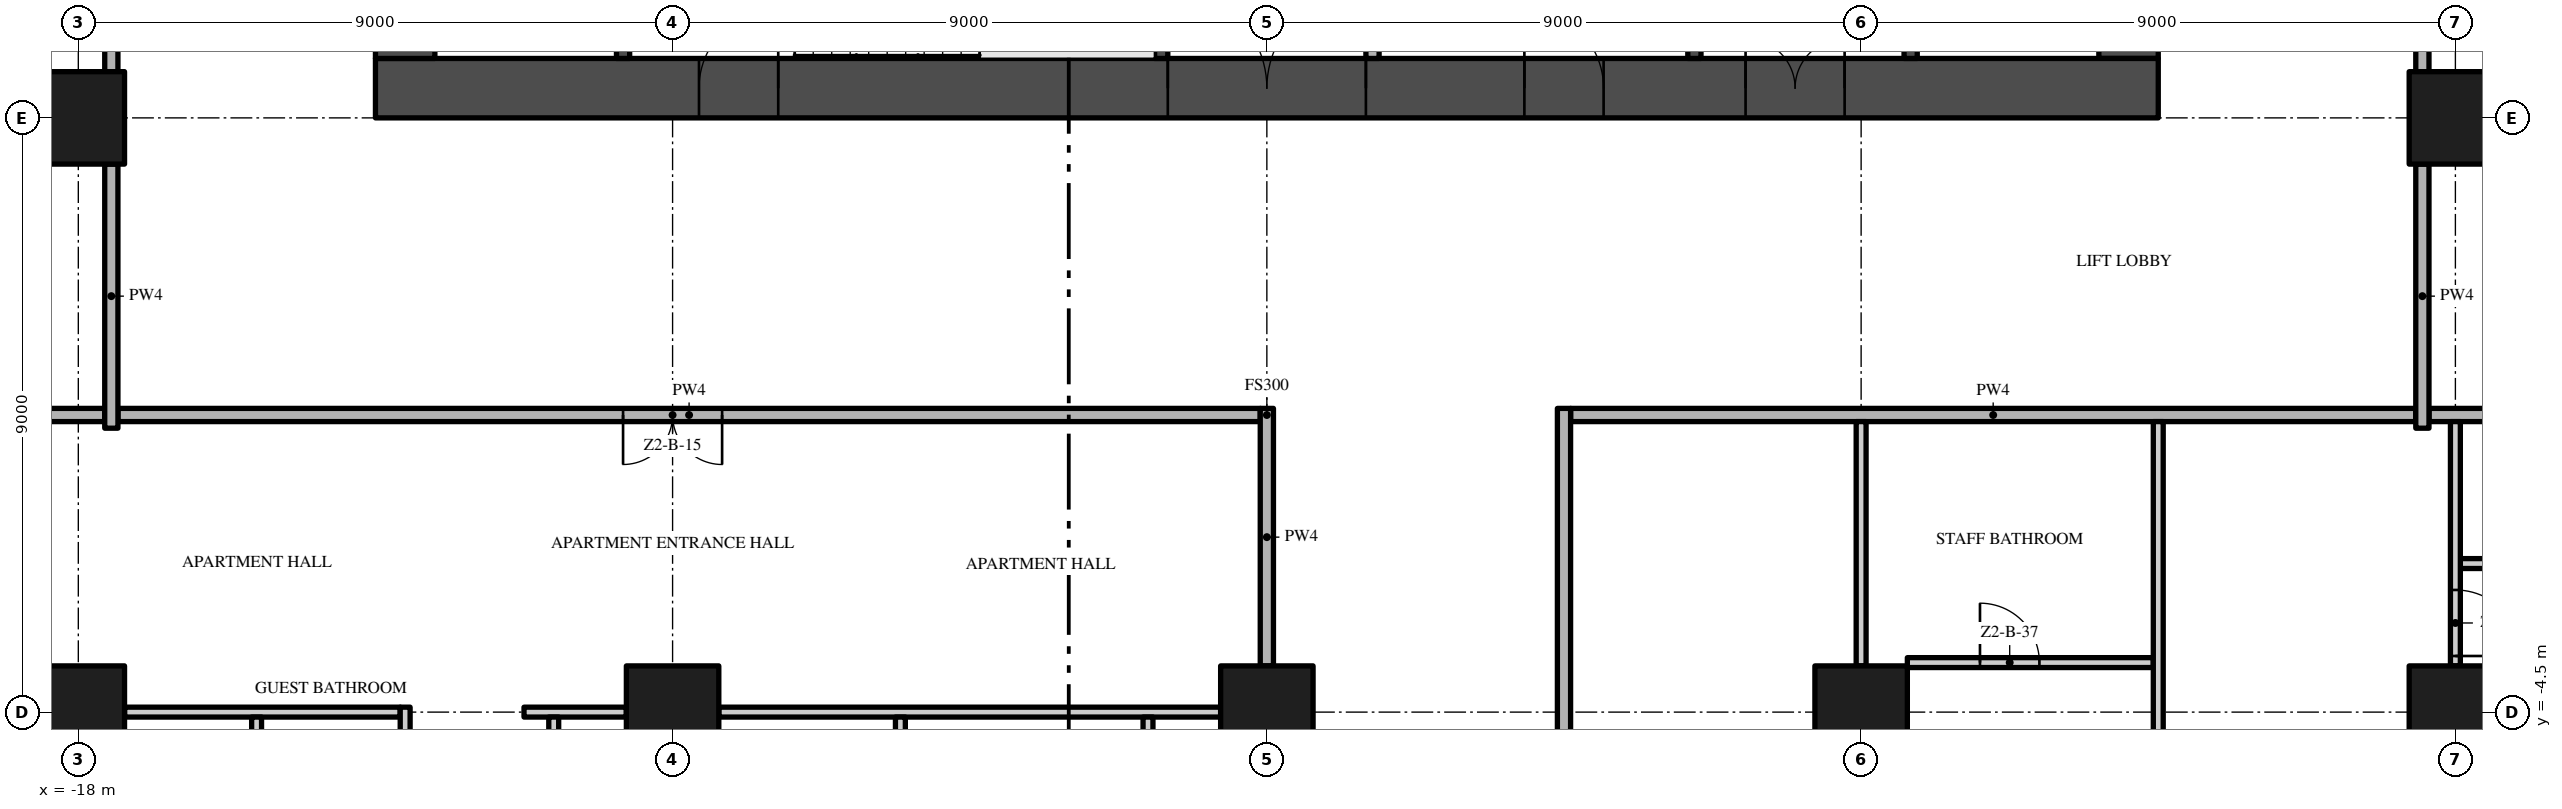
"""IFC4 building model, lengths in metres.
Left out: names, types, materials, properties, quantities, classifications, styles, units other than length and angle.
Written with IfcOpenShell. Run it as: python <this file> out.ifc"""

import sys

from ifc_helpers import new_model, si_unit, direction, frame, frame_2d, origin, origin_2d, place, context, subcontext, project, spatial, rectangle, extrude, element, fill, save


model = new_model("IFC4")
c1 = context("Model", 3, precision=1e-05, world=origin(), true_north=direction((0.0, 1.0)))
c2 = subcontext(c1, "Body", "Model", "MODEL_VIEW")
j1 = project(units=[si_unit("LENGTHUNIT", "METRE"), si_unit("PLANEANGLEUNIT", "RADIAN")], contexts=[c1])
p1 = place(None, origin())
s1 = spatial("IfcSite", under=j1, at=p1, CompositionType="ELEMENT")
p2 = place(p1, origin())
s2 = spatial("IfcBuilding", under=s1, at=p2, CompositionType="ELEMENT")
p3 = place(p2, frame((0.0, 0.0, 80.8)))
s3 = spatial("IfcBuildingStorey", under=s2, at=p3, CompositionType="ELEMENT", Elevation=80.8)
p4 = place(p3, frame((-13.5, 4.95, -0.3), z_axis=(0.0, 0.0, 1.0), x_axis=(1.0, 0.0, 0.0)))
e1 = element("IfcWall", 1, at=p4, inside=s3, PredefinedType="SHEAR", context=c2, shape_type="SweptSolid", body=[
    extrude(rectangle(XDim=27.0, YDim=0.9, at=frame_2d((13.5, 0.0))), origin(), (0.0, 0.0, 1.0), 3.8),
])
p5 = place(p4, frame((12.0, 0.0, 0.3)))
e2 = element("IfcOpeningElement", 2, at=p5, cuts=e1, PredefinedType="OPENING", context=c2, shape_type="SweptSolid", body=[
    extrude(rectangle(XDim=3.0, YDim=2.4, at=frame_2d((1.5, 1.2))), frame((0.0, 0.46, 0.0), z_axis=(0.0, -1.0, 0.0), x_axis=(1.0, 0.0, 0.0)), (0.0, 0.0, 1.0), 0.92),
])
p6 = place(p4, frame((4.9, 0.0, 0.3)))
e3 = element("IfcOpeningElement", 3, at=p6, cuts=e1, PredefinedType="OPENING", context=c2, shape_type="SweptSolid", body=[
    extrude(rectangle(XDim=1.2, YDim=2.2, at=frame_2d((0.6, 1.1))), frame((0.0, 0.46, 0.0), z_axis=(0.0, -1.0, 0.0), x_axis=(1.0, 0.0, 0.0)), (0.0, 0.0, 1.0), 0.92),
])
p7 = place(p4, frame((20.75, 0.0, 0.3)))
e4 = element("IfcOpeningElement", 4, at=p7, cuts=e1, PredefinedType="OPENING", context=c2, shape_type="SweptSolid", body=[
    extrude(rectangle(XDim=1.5, YDim=2.2, at=frame_2d((0.75, 1.1))), frame((0.0, 0.46, 0.0), z_axis=(0.0, -1.0, 0.0), x_axis=(1.0, 0.0, 0.0)), (0.0, 0.0, 1.0), 0.92),
])
p8 = place(p4, frame((17.4, 0.0, 0.3)))
e5 = element("IfcOpeningElement", 5, at=p8, cuts=e1, PredefinedType="OPENING", context=c2, shape_type="SweptSolid", body=[
    extrude(rectangle(XDim=1.2, YDim=2.2, at=frame_2d((0.6, 1.1))), frame((0.0, 0.46, 0.0), z_axis=(0.0, -1.0, 0.0), x_axis=(1.0, 0.0, 0.0)), (0.0, 0.0, 1.0), 0.92),
])
p9 = place(p3, frame((13.05, 5.4, -0.3), z_axis=(0.0, 0.0, 1.0), x_axis=(0.0, 1.0, 0.0)))
e6 = element("IfcWall", 6, at=p9, inside=s3, PredefinedType="SHEAR", context=c2, shape_type="SweptSolid", body=[
    extrude(rectangle(XDim=16.2, YDim=0.9, at=frame_2d((8.1, 0.0))), origin(), (0.0, 0.0, 1.0), 3.8),
])
p10 = place(p9, frame((6.0, 0.0, 0.3)))
e7 = element("IfcOpeningElement", 7, at=p10, cuts=e6, PredefinedType="OPENING", context=c2, shape_type="SweptSolid", body=[
    extrude(rectangle(XDim=1.2, YDim=2.2, at=frame_2d((0.6, 1.1))), frame((0.0, 0.46, 0.0), z_axis=(0.0, -1.0, 0.0), x_axis=(1.0, 0.0, 0.0)), (0.0, 0.0, 1.0), 0.92),
])
p11 = place(p3, frame((-13.05, 21.6, -0.3), z_axis=(0.0, 0.0, 1.0), x_axis=(0.0, -1.0, 0.0)))
e8 = element("IfcWall", 8, at=p11, inside=s3, PredefinedType="SHEAR", context=c2, shape_type="SweptSolid", body=[
    extrude(rectangle(XDim=16.2, YDim=0.9, at=frame_2d((8.1, 0.0))), origin(), (0.0, 0.0, 1.0), 3.8),
])
p12 = place(p11, frame((9.0, 0.0, 0.3)))
e9 = element("IfcOpeningElement", 9, at=p12, cuts=e8, PredefinedType="OPENING", context=c2, shape_type="SweptSolid", body=[
    extrude(rectangle(XDim=1.2, YDim=2.2, at=frame_2d((0.6, 1.1))), frame((0.0, 0.46, 0.0), z_axis=(0.0, -1.0, 0.0), x_axis=(1.0, 0.0, 0.0)), (0.0, 0.0, 1.0), 0.92),
])
for number, where, z_axis, x_axis in (
    (10, (-18.0, -4.5, 0.0), (0.0, 0.0, 1.0), (1.0, 0.0, 0.0)),
    (11, (-18.0, 4.5, 0.0), (0.0, 0.0, 1.0), (1.0, 0.0, 0.0)),
    (12, (-9.0, -4.5, 0.0), (0.0, 0.0, 1.0), (1.0, 0.0, 0.0)),
    (13, (0.0, -4.5, 0.0), (0.0, 0.0, 1.0), (1.0, 0.0, 0.0)),
    (14, (18.0, -4.5, 0.0), (0.0, 0.0, 1.0), (1.0, 0.0, 0.0)),
    (15, (18.0, 4.5, 0.0), (0.0, 0.0, 1.0), (1.0, 0.0, 0.0)),
    (16, (9.0, -4.5, 0.0), (0.0, 0.0, 1.0), (1.0, 0.0, 0.0)),
):
    element("IfcColumn", number, at=place(p3, frame(where, z_axis=z_axis, x_axis=x_axis)), inside=s3, PredefinedType="COLUMN", context=c2, shape_type="SweptSolid", body=[
        extrude(rectangle(XDim=1.4, YDim=1.4, at=origin_2d()), origin(), (0.0, 0.0, 1.0), 3.5),
    ])
for number, where, z_axis, x_axis in (
    (17, (-9.75, 5.4, 0.0), (0.0, 0.0, 1.0), (0.0, 1.0, 0.0)),
    (18, (-1.6, 5.4, 0.0), (0.0, 0.0, 1.0), (0.0, 1.0, 0.0)),
):
    element("IfcWall", number, at=place(p3, frame(where, z_axis=z_axis, x_axis=x_axis)), inside=s3, PredefinedType="SHEAR", context=c2, shape_type="SweptSolid", body=[
        extrude(rectangle(XDim=2.55, YDim=0.2, at=frame_2d((1.275, 0.0))), origin(), (0.0, 0.0, 1.0), 3.5),
    ])
p13 = place(p3, frame((1.6, 7.5, 0.0), z_axis=(0.0, 0.0, 1.0), x_axis=(0.0, -1.0, 0.0)))
e19 = element("IfcWall", 19, at=p13, inside=s3, PredefinedType="PARTITIONING", context=c2, shape_type="SweptSolid", body=[
    extrude(rectangle(XDim=2.1, YDim=0.2, at=frame_2d((1.05, 0.0))), origin(), (0.0, 0.0, 1.0), 3.5),
])
p14 = place(p13, frame((0.25, 0.0, 0.0)))
e20 = element("IfcOpeningElement", 20, at=p14, cuts=e19, PredefinedType="OPENING", context=c2, shape_type="SweptSolid", body=[
    extrude(rectangle(XDim=0.9, YDim=2.1, at=frame_2d((0.45, 1.05))), frame((0.0, 0.11, 0.0), z_axis=(0.0, -1.0, 0.0), x_axis=(1.0, 0.0, 0.0)), (0.0, 0.0, 1.0), 0.22),
])
p15 = place(p3, frame((6.475, 5.4, 0.0), z_axis=(0.0, 0.0, 1.0), x_axis=(0.0, 1.0, 0.0)))
e21 = element("IfcWall", 21, at=p15, inside=s3, PredefinedType="SHEAR", context=c2, shape_type="SweptSolid", body=[
    extrude(rectangle(XDim=2.1, YDim=0.2, at=frame_2d((1.05, 0.0))), origin(), (0.0, 0.0, 1.0), 3.5),
])
p16 = place(p3, frame((9.75, 5.4, 0.0), z_axis=(0.0, 0.0, 1.0), x_axis=(0.0, 1.0, 0.0)))
e22 = element("IfcWall", 22, at=p16, inside=s3, PredefinedType="SHEAR", context=c2, shape_type="SweptSolid", body=[
    extrude(rectangle(XDim=2.2, YDim=0.2, at=frame_2d((1.1, 0.0))), origin(), (0.0, 0.0, 1.0), 3.5),
])
p17 = place(p16, frame((0.55, 0.0, 0.0)))
e23 = element("IfcOpeningElement", 23, at=p17, cuts=e22, PredefinedType="OPENING", context=c2, shape_type="SweptSolid", body=[
    extrude(rectangle(XDim=1.1, YDim=2.1, at=frame_2d((0.55, 1.05))), frame((0.0, 0.11, 0.0), z_axis=(0.0, -1.0, 0.0), x_axis=(1.0, 0.0, 0.0)), (0.0, 0.0, 1.0), 0.22),
])
p18 = place(p3, frame((-17.3, -4.5, 0.0), z_axis=(0.0, 0.0, 1.0), x_axis=(1.0, 0.0, 0.0)))
e24 = element("IfcWall", 24, at=p18, inside=s3, PredefinedType="PARTITIONING", context=c2, shape_type="SweptSolid", body=[
    extrude(rectangle(XDim=4.175, YDim=0.15, at=frame_2d((2.087, 0.0))), origin(), (0.0, 0.0, 1.0), 3.5),
])
p19 = place(p3, frame((-11.25, -4.5, 0.0), z_axis=(0.0, 0.0, 1.0), x_axis=(1.0, 0.0, 0.0)))
e25 = element("IfcWall", 25, at=p19, inside=s3, PredefinedType="PARTITIONING", context=c2, shape_type="SweptSolid", body=[
    extrude(rectangle(XDim=1.55, YDim=0.15, at=frame_2d((0.775, 0.0))), origin(), (0.0, 0.0, 1.0), 3.5),
])
p20 = place(p3, frame((-8.3, -4.5, 0.0), z_axis=(0.0, 0.0, 1.0), x_axis=(1.0, 0.0, 0.0)))
e26 = element("IfcWall", 26, at=p20, inside=s3, PredefinedType="PARTITIONING", context=c2, shape_type="SweptSolid", body=[
    extrude(rectangle(XDim=7.6, YDim=0.15, at=frame_2d((3.8, 0.0))), origin(), (0.0, 0.0, 1.0), 3.5),
])
p21 = place(p3, frame((9.7, -3.75, 0.0), z_axis=(0.0, 0.0, 1.0), x_axis=(1.0, 0.0, 0.0)))
e27 = element("IfcWall", 27, at=p21, inside=s3, PredefinedType="PARTITIONING", context=c2, shape_type="SweptSolid", body=[
    extrude(rectangle(XDim=3.725, YDim=0.15, at=frame_2d((1.863, 0.0))), origin(), (0.0, 0.0, 1.0), 3.5),
])
p22 = place(p21, frame((1.1, 0.0, 0.0)))
e28 = element("IfcOpeningElement", 28, at=p22, cuts=e27, PredefinedType="OPENING", context=c2, shape_type="SweptSolid", body=[
    extrude(rectangle(XDim=0.9, YDim=2.1, at=frame_2d((0.45, 1.05))), frame((0.0, 0.085, 0.0), z_axis=(0.0, -1.0, 0.0), x_axis=(1.0, 0.0, 0.0)), (0.0, 0.0, 1.0), 0.17),
])
p23 = place(p3, frame((18.075, -2.25, 0.0), z_axis=(0.0, 0.0, 1.0), x_axis=(1.0, 0.0, 0.0)))
e29 = element("IfcWall", 29, at=p23, inside=s3, PredefinedType="PARTITIONING", context=c2, shape_type="SweptSolid", body=[
    extrude(rectangle(XDim=2.85, YDim=0.15, at=frame_2d((1.425, 0.0))), origin(), (0.0, 0.0, 1.0), 3.5),
])
p24 = place(p3, frame((-0.1, 0.0, 0.0), z_axis=(0.0, 0.0, 1.0), x_axis=(-1.0, 0.0, 0.0)))
e30 = element("IfcWall", 30, at=p24, inside=s3, PredefinedType="PARTITIONING", context=c2, shape_type="SweptSolid", body=[
    extrude(rectangle(XDim=17.3, YDim=0.2, at=frame_2d((8.65, 0.0))), origin(), (0.0, 0.0, 1.0), 3.5),
])
p25 = place(p24, frame((8.15, 0.0, 0.0)))
e31 = element("IfcOpeningElement", 31, at=p25, cuts=e30, PredefinedType="OPENING", context=c2, shape_type="SweptSolid", body=[
    extrude(rectangle(XDim=1.5, YDim=2.4, at=frame_2d((0.75, 1.2))), frame((0.0, 0.11, 0.0), z_axis=(0.0, -1.0, 0.0), x_axis=(1.0, 0.0, 0.0)), (0.0, 0.0, 1.0), 0.22),
])
p26 = place(p3, frame((4.6, 0.0, 0.0), z_axis=(0.0, 0.0, 1.0), x_axis=(1.0, 0.0, 0.0)))
e32 = element("IfcWall", 32, at=p26, inside=s3, PredefinedType="PARTITIONING", context=c2, shape_type="SweptSolid", body=[
    extrude(rectangle(XDim=12.8, YDim=0.2, at=frame_2d((6.4, 0.0))), origin(), (0.0, 0.0, 1.0), 3.5),
])
for number, where, z_axis, x_axis in (
    (33, (-26.7, 0.0, 0.0), (0.0, 0.0, 1.0), (1.0, 0.0, 0.0)),
    (34, (17.6, 0.0, 0.0), (0.0, 0.0, 1.0), (1.0, 0.0, 0.0)),
):
    element("IfcWall", number, at=place(p3, frame(where, z_axis=z_axis, x_axis=x_axis)), inside=s3, PredefinedType="PARTITIONING", context=c2, shape_type="SweptSolid", body=[
        extrude(rectangle(XDim=9.1, YDim=0.2, at=frame_2d((4.55, 0.0))), origin(), (0.0, 0.0, 1.0), 3.5),
    ])
p27 = place(p3, frame((-17.5, -0.2, 0.0), z_axis=(0.0, 0.0, 1.0), x_axis=(0.0, 1.0, 0.0)))
e35 = element("IfcWall", 35, at=p27, inside=s3, PredefinedType="PARTITIONING", context=c2, shape_type="SweptSolid", body=[
    extrude(rectangle(XDim=4.0, YDim=0.2, at=frame_2d((2.0, 0.0))), origin(), (0.0, 0.0, 1.0), 3.5),
])
p28 = place(p3, frame((-17.5, 5.2, 0.0), z_axis=(0.0, 0.0, 1.0), x_axis=(0.0, 1.0, 0.0)))
e36 = element("IfcWall", 36, at=p28, inside=s3, PredefinedType="PARTITIONING", context=c2, shape_type="SweptSolid", body=[
    extrude(rectangle(XDim=7.6, YDim=0.2, at=frame_2d((3.8, 0.0))), origin(), (0.0, 0.0, 1.0), 3.5),
])
p29 = place(p3, frame((-15.3, -8.925, 0.0), z_axis=(0.0, 0.0, 1.0), x_axis=(0.0, 1.0, 0.0)))
e37 = element("IfcWall", 37, at=p29, inside=s3, PredefinedType="PARTITIONING", context=c2, shape_type="SweptSolid", body=[
    extrude(rectangle(XDim=4.35, YDim=0.15, at=frame_2d((2.175, 0.0))), origin(), (0.0, 0.0, 1.0), 3.5),
])
p30 = place(p3, frame((-13.05, -9.075, 0.0), z_axis=(0.0, 0.0, 1.0), x_axis=(0.0, 1.0, 0.0)))
e38 = element("IfcWall", 38, at=p30, inside=s3, PredefinedType="PARTITIONING", context=c2, shape_type="SweptSolid", body=[
    extrude(rectangle(XDim=4.65, YDim=0.15, at=frame_2d((2.325, 0.0))), origin(), (0.0, 0.0, 1.0), 3.5),
])
p31 = place(p30, frame((1.875, 0.0, 0.0)))
e39 = element("IfcOpeningElement", 39, at=p31, cuts=e38, PredefinedType="OPENING", context=c2, shape_type="SweptSolid", body=[
    extrude(rectangle(XDim=0.9, YDim=2.1, at=frame_2d((0.45, 1.05))), frame((0.0, 0.085, 0.0), z_axis=(0.0, -1.0, 0.0), x_axis=(1.0, 0.0, 0.0)), (0.0, 0.0, 1.0), 0.17),
])
p32 = place(p3, frame((-10.8, -9.075, 0.0), z_axis=(0.0, 0.0, 1.0), x_axis=(0.0, 1.0, 0.0)))
e40 = element("IfcWall", 40, at=p32, inside=s3, PredefinedType="PARTITIONING", context=c2, shape_type="SweptSolid", body=[
    extrude(rectangle(XDim=4.5, YDim=0.15, at=frame_2d((2.25, 0.0))), origin(), (0.0, 0.0, 1.0), 3.5),
])
p33 = place(p3, frame((-5.55, -4.575, 0.0), z_axis=(0.0, 0.0, 1.0), x_axis=(0.0, -1.0, 0.0)))
e41 = element("IfcWall", 41, at=p33, inside=s3, PredefinedType="PARTITIONING", context=c2, shape_type="SweptSolid", body=[
    extrude(rectangle(XDim=4.35, YDim=0.15, at=frame_2d((2.175, 0.0))), origin(), (0.0, 0.0, 1.0), 3.5),
])
p34 = place(p33, frame((1.7, 0.0, 0.0)))
e42 = element("IfcOpeningElement", 42, at=p34, cuts=e41, PredefinedType="OPENING", context=c2, shape_type="SweptSolid", body=[
    extrude(rectangle(XDim=0.9, YDim=2.1, at=frame_2d((0.45, 1.05))), frame((0.0, 0.085, 0.0), z_axis=(0.0, -1.0, 0.0), x_axis=(1.0, 0.0, 0.0)), (0.0, 0.0, 1.0), 0.17),
])
p35 = place(p3, frame((-1.8, -8.925, 0.0), z_axis=(0.0, 0.0, 1.0), x_axis=(0.0, 1.0, 0.0)))
e43 = element("IfcWall", 43, at=p35, inside=s3, PredefinedType="PARTITIONING", context=c2, shape_type="SweptSolid", body=[
    extrude(rectangle(XDim=4.35, YDim=0.15, at=frame_2d((2.175, 0.0))), origin(), (0.0, 0.0, 1.0), 3.5),
])
p36 = place(p3, frame((0.0, -3.8, 0.0), z_axis=(0.0, 0.0, 1.0), x_axis=(0.0, 1.0, 0.0)))
e44 = element("IfcWall", 44, at=p36, inside=s3, PredefinedType="PARTITIONING", context=c2, shape_type="SweptSolid", body=[
    extrude(rectangle(XDim=3.9, YDim=0.2, at=frame_2d((1.95, 0.0))), origin(), (0.0, 0.0, 1.0), 3.5),
])
p37 = place(p3, frame((4.5, 0.1, 0.0), z_axis=(0.0, 0.0, 1.0), x_axis=(0.0, -1.0, 0.0)))
e45 = element("IfcWall", 45, at=p37, inside=s3, PredefinedType="PARTITIONING", context=c2, shape_type="SweptSolid", body=[
    extrude(rectangle(XDim=22.3, YDim=0.2, at=frame_2d((11.15, 0.0))), origin(), (0.0, 0.0, 1.0), 3.5),
])
p38 = place(p37, frame((10.6, 0.0, 0.0)))
e46 = element("IfcOpeningElement", 46, at=p38, cuts=e45, PredefinedType="OPENING", context=c2, shape_type="SweptSolid", body=[
    extrude(rectangle(XDim=1.5, YDim=2.4, at=frame_2d((0.75, 1.2))), frame((0.0, 0.11, 0.0), z_axis=(0.0, -1.0, 0.0), x_axis=(1.0, 0.0, 0.0)), (0.0, 0.0, 1.0), 0.22),
])
p39 = place(p3, frame((9.0, -3.8, 0.0), z_axis=(0.0, 0.0, 1.0), x_axis=(0.0, 1.0, 0.0)))
e47 = element("IfcWall", 47, at=p39, inside=s3, PredefinedType="PARTITIONING", context=c2, shape_type="SweptSolid", body=[
    extrude(rectangle(XDim=3.7, YDim=0.15, at=frame_2d((1.85, 0.0))), origin(), (0.0, 0.0, 1.0), 3.5),
])
p40 = place(p3, frame((13.5, -9.075, 0.0), z_axis=(0.0, 0.0, 1.0), x_axis=(0.0, 1.0, 0.0)))
e48 = element("IfcWall", 48, at=p40, inside=s3, PredefinedType="PARTITIONING", context=c2, shape_type="SweptSolid", body=[
    extrude(rectangle(XDim=8.975, YDim=0.15, at=frame_2d((4.487, 0.0))), origin(), (0.0, 0.0, 1.0), 3.5),
])
p41 = place(p3, frame((17.5, -0.2, 0.0), z_axis=(0.0, 0.0, 1.0), x_axis=(0.0, 1.0, 0.0)))
e49 = element("IfcWall", 49, at=p41, inside=s3, PredefinedType="PARTITIONING", context=c2, shape_type="SweptSolid", body=[
    extrude(rectangle(XDim=4.0, YDim=0.2, at=frame_2d((2.0, 0.0))), origin(), (0.0, 0.0, 1.0), 3.5),
])
p42 = place(p3, frame((17.5, 12.8, 0.0), z_axis=(0.0, 0.0, 1.0), x_axis=(0.0, -1.0, 0.0)))
e50 = element("IfcWall", 50, at=p42, inside=s3, PredefinedType="PARTITIONING", context=c2, shape_type="SweptSolid", body=[
    extrude(rectangle(XDim=7.6, YDim=0.2, at=frame_2d((3.8, 0.0))), origin(), (0.0, 0.0, 1.0), 3.5),
])
p43 = place(p42, frame((5.45, 0.0, 0.0)))
e51 = element("IfcOpeningElement", 51, at=p43, cuts=e50, PredefinedType="OPENING", context=c2, shape_type="SweptSolid", body=[
    extrude(rectangle(XDim=1.2, YDim=2.4, at=frame_2d((0.6, 1.2))), frame((0.0, 0.11, 0.0), z_axis=(0.0, -1.0, 0.0), x_axis=(1.0, 0.0, 0.0)), (0.0, 0.0, 1.0), 0.22),
])
p44 = place(p3, frame((18.0, -0.1, 0.0), z_axis=(0.0, 0.0, 1.0), x_axis=(0.0, -1.0, 0.0)))
e52 = element("IfcWall", 52, at=p44, inside=s3, PredefinedType="PARTITIONING", context=c2, shape_type="SweptSolid", body=[
    extrude(rectangle(XDim=3.7, YDim=0.15, at=frame_2d((1.85, 0.0))), origin(), (0.0, 0.0, 1.0), 3.5),
])
p45 = place(p44, frame((2.55, 0.0, 0.0)))
e53 = element("IfcOpeningElement", 53, at=p45, cuts=e52, PredefinedType="OPENING", context=c2, shape_type="SweptSolid", body=[
    extrude(rectangle(XDim=1.0, YDim=2.4, at=frame_2d((0.5, 1.2))), frame((0.0, 0.085, 0.0), z_axis=(0.0, -1.0, 0.0), x_axis=(1.0, 0.0, 0.0)), (0.0, 0.0, 1.0), 0.17),
])
p46 = place(p5, frame((3.0, 0.0, 0.0), z_axis=(0.0, 0.0, 1.0), x_axis=(-1.0, 0.0, 0.0)))
e54 = element("IfcDoor", 54, at=p46, inside=s3, OperationType="DOUBLE_DOOR_SINGLE_SWING", PredefinedType="DOOR", context=c2, shape_type="SweptSolid", body=[
    extrude(rectangle(XDim=3.0, YDim=2.4, at=frame_2d((1.5, 1.2))), frame((0.0, 0.025, 0.0), z_axis=(0.0, -1.0, 0.0), x_axis=(1.0, 0.0, 0.0)), (0.0, 0.0, 1.0), 0.05),
])
fill(e2, e54)
p47 = place(p6, frame((1.2, 0.0, 0.0), z_axis=(0.0, 0.0, 1.0), x_axis=(-1.0, 0.0, 0.0)))
e55 = element("IfcDoor", 55, at=p47, inside=s3, OperationType="SINGLE_SWING_LEFT", PredefinedType="DOOR", context=c2, shape_type="SweptSolid", body=[
    extrude(rectangle(XDim=1.2, YDim=2.2, at=frame_2d((0.6, 1.1))), frame((0.0, 0.025, 0.0), z_axis=(0.0, -1.0, 0.0), x_axis=(1.0, 0.0, 0.0)), (0.0, 0.0, 1.0), 0.05),
])
fill(e3, e55)
p48 = place(p7, frame((1.5, 0.0, 0.0), z_axis=(0.0, 0.0, 1.0), x_axis=(-1.0, 0.0, 0.0)))
e56 = element("IfcDoor", 56, at=p48, inside=s3, OperationType="DOUBLE_DOOR_SINGLE_SWING", PredefinedType="DOOR", context=c2, shape_type="SweptSolid", body=[
    extrude(rectangle(XDim=1.5, YDim=2.2, at=frame_2d((0.75, 1.1))), frame((0.0, 0.025, 0.0), z_axis=(0.0, -1.0, 0.0), x_axis=(1.0, 0.0, 0.0)), (0.0, 0.0, 1.0), 0.05),
])
fill(e4, e56)
p49 = place(p8, frame((1.2, 0.0, 0.0), z_axis=(0.0, 0.0, 1.0), x_axis=(-1.0, 0.0, 0.0)))
e57 = element("IfcDoor", 57, at=p49, inside=s3, OperationType="SINGLE_SWING_RIGHT", PredefinedType="DOOR", context=c2, shape_type="SweptSolid", body=[
    extrude(rectangle(XDim=1.2, YDim=2.2, at=frame_2d((0.6, 1.1))), frame((0.0, 0.025, 0.0), z_axis=(0.0, -1.0, 0.0), x_axis=(1.0, 0.0, 0.0)), (0.0, 0.0, 1.0), 0.05),
])
fill(e5, e57)
p50 = place(p25, origin())
e58 = element("IfcDoor", 58, at=p50, inside=s3, OperationType="DOUBLE_DOOR_SINGLE_SWING", PredefinedType="DOOR", context=c2, shape_type="SweptSolid", body=[
    extrude(rectangle(XDim=1.5, YDim=2.4, at=frame_2d((0.75, 1.2))), frame((0.0, 0.025, 0.0), z_axis=(0.0, -1.0, 0.0), x_axis=(1.0, 0.0, 0.0)), (0.0, 0.0, 1.0), 0.05),
])
fill(e31, e58)
p51 = place(p22, origin())
e59 = element("IfcDoor", 59, at=p51, inside=s3, OperationType="SINGLE_SWING_LEFT", PredefinedType="DOOR", context=c2, shape_type="SweptSolid", body=[
    extrude(rectangle(XDim=0.9, YDim=2.1, at=frame_2d((0.45, 1.05))), frame((0.0, 0.025, 0.0), z_axis=(0.0, -1.0, 0.0), x_axis=(1.0, 0.0, 0.0)), (0.0, 0.0, 1.0), 0.05),
])
fill(e28, e59)
p52 = place(p45, origin())
e60 = element("IfcDoor", 60, at=p52, inside=s3, OperationType="SINGLE_SWING_RIGHT", PredefinedType="DOOR", context=c2, shape_type="SweptSolid", body=[
    extrude(rectangle(XDim=1.0, YDim=2.4, at=frame_2d((0.5, 1.2))), frame((0.0, 0.025, 0.0), z_axis=(0.0, -1.0, 0.0), x_axis=(1.0, 0.0, 0.0)), (0.0, 0.0, 1.0), 0.05),
])
fill(e53, e60)
save(model, sys.argv[1])
